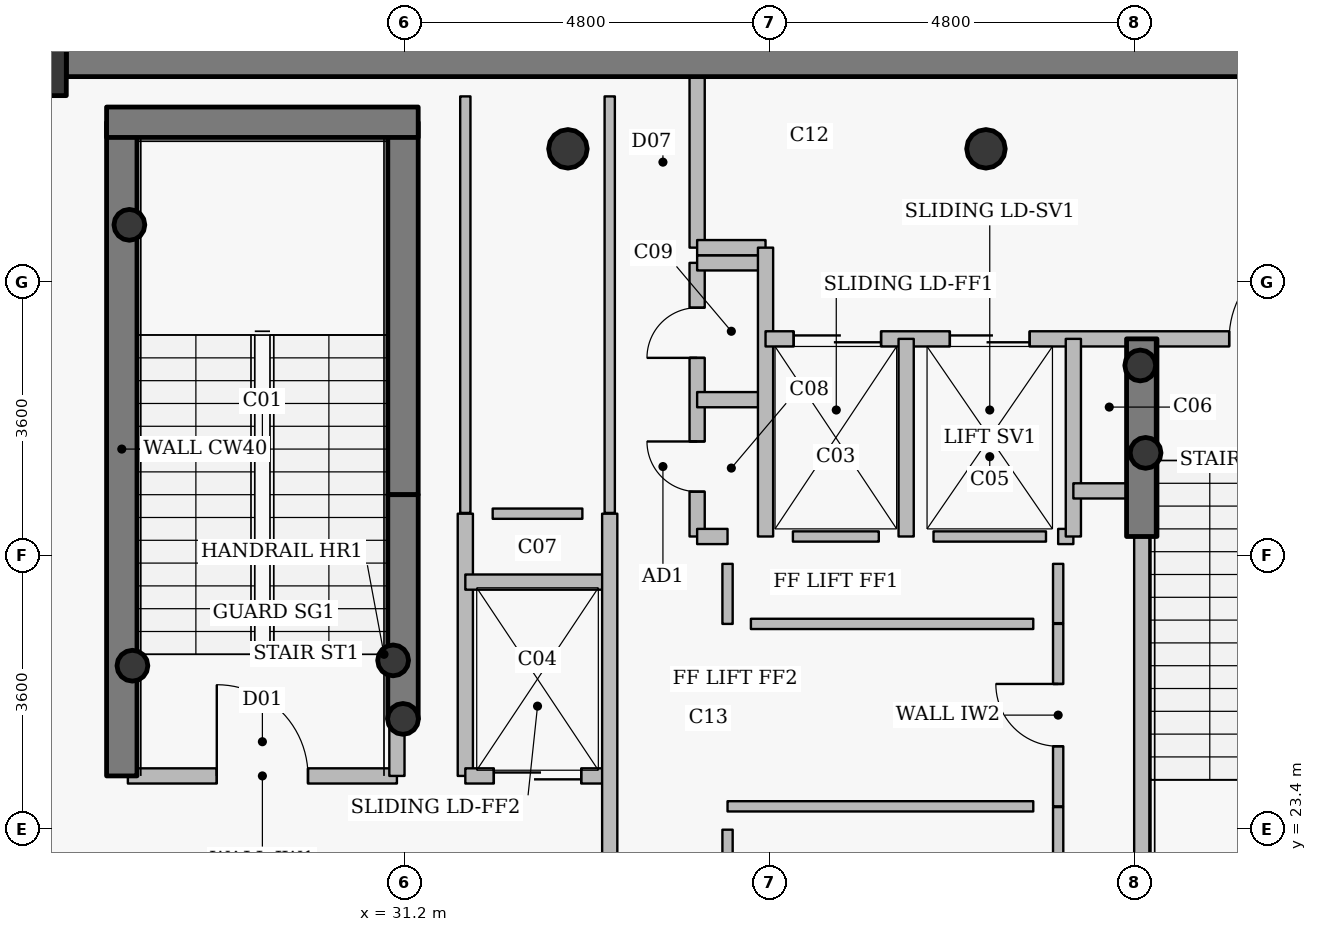
"""IFC4 building model, lengths in metres.
Left out: names, types, materials, properties, quantities, classifications, styles, units other than length and angle.
Written with IfcOpenShell. Run it as: python <this file> out.ifc"""

import sys

from ifc_helpers import new_model, si_unit, direction, frame, frame_2d, origin, origin_2d, place, context, subcontext, project, spatial, rectangle, hollow_circle, extrude, source, transform, mapped, element, fill, save


model = new_model("IFC4")
c1 = context("Model", 3, precision=1e-05, world=origin(), true_north=direction((0.0, 1.0)))
c2 = subcontext(c1, "Body", "Model", "MODEL_VIEW")
j1 = project(units=[si_unit("LENGTHUNIT", "METRE"), si_unit("PLANEANGLEUNIT", "RADIAN")], contexts=[c1])
p1 = place(None, origin())
s1 = spatial("IfcSite", under=j1, at=p1, CompositionType="ELEMENT")
p2 = place(p1, origin())
s2 = spatial("IfcBuilding", under=s1, at=p2, CompositionType="ELEMENT")
p3 = place(p2, frame((0.0, 0.0, -9.0)))
s3 = spatial("IfcBuildingStorey", under=s2, at=p3, CompositionType="ELEMENT", Elevation=-9.0)
p4 = place(p3, frame((26.05, 33.75, 0.0), z_axis=(0.0, 0.0, 1.0), x_axis=(1.0, 0.0, 0.0)))
e1 = element("IfcColumn", 1, at=p4, inside=s3, PredefinedType="COLUMN", context=c2, shape_type="SweptSolid", body=[
    extrude(rectangle(XDim=1.4, YDim=1.4, at=origin_2d()), origin(), (0.0, 0.0, 1.0), 4.5),
])
for number, where, z_axis, x_axis in (
    (2, (38.85, 32.35, 0.0), (0.0, 0.0, 1.0), (1.0, 0.0, 0.0)),
    (3, (33.35, 32.35, 0.0), (0.0, 0.0, 1.0), (1.0, 0.0, 0.0)),
):
    element("IfcColumn", number, at=place(p3, frame(where, z_axis=z_axis, x_axis=x_axis)), inside=s3, PredefinedType="COLUMN", context=c2, shape_type="SweptSolid", body=[
        extrude(hollow_circle(Radius=0.254, WallThickness=0.02, at=origin_2d()), origin(), (0.0, 0.0, 1.0), 4.5),
    ])
p5 = place(p3, frame((27.48, 24.1, 0.0), z_axis=(0.0, 0.0, 1.0), x_axis=(0.0, 1.0, 0.0)))
e4 = element("IfcWall", 4, at=p5, inside=s3, PredefinedType="SHEAR", context=c2, shape_type="SweptSolid", body=[
    extrude(rectangle(XDim=8.6, YDim=0.4, at=frame_2d((4.3, 0.0))), origin(), (0.0, 0.0, 1.0), 4.5),
])
p6 = place(p3, frame((31.18, 27.8, 0.0), z_axis=(0.0, 0.0, 1.0), x_axis=(0.0, 1.0, 0.0)))
e5 = element("IfcWall", 5, at=p6, inside=s3, PredefinedType="SHEAR", context=c2, shape_type="SweptSolid", body=[
    extrude(rectangle(XDim=4.9, YDim=0.4, at=frame_2d((2.45, 0.0))), origin(), (0.0, 0.0, 1.0), 4.5),
])
p7 = place(p3, frame((27.28, 32.7, 0.0), z_axis=(0.0, 0.0, 1.0), x_axis=(1.0, 0.0, 0.0)))
e6 = element("IfcWall", 6, at=p7, inside=s3, PredefinedType="SHEAR", context=c2, shape_type="SweptSolid", body=[
    extrude(rectangle(XDim=4.1, YDim=0.4, at=frame_2d((2.05, 0.0))), origin(), (0.0, 0.0, 1.0), 4.5),
])
for number, where, z_axis, x_axis in (
    (7, (27.58, 31.35, 0.0), (0.0, 0.0, 1.0), (1.0, 0.0, 0.0)),
    (8, (31.05, 25.62, 0.0), (0.0, 0.0, 1.0), (1.0, 0.0, 0.0)),
    (9, (31.18, 24.85, 0.0), (0.0, 0.0, 1.0), (1.0, 0.0, 0.0)),
    (10, (27.62, 25.55, 0.0), (0.0, 0.0, 1.0), (1.0, 0.0, 0.0)),
    (11, (40.95, 28.35, 0.0), (0.0, 0.0, 1.0), (1.0, 0.0, 0.0)),
    (12, (40.88, 29.5, 0.0), (0.0, 0.0, 1.0), (1.0, 0.0, 0.0)),
):
    element("IfcColumn", number, at=place(p3, frame(where, z_axis=z_axis, x_axis=x_axis)), inside=s3, PredefinedType="COLUMN", context=c2, shape_type="SweptSolid", body=[
        extrude(hollow_circle(Radius=0.203, WallThickness=0.016, at=origin_2d()), origin(), (0.0, 0.0, 1.0), 4.5),
    ])
p8 = place(p3, frame((26.75, 33.75, 0.0), z_axis=(0.0, 0.0, 1.0), x_axis=(1.0, 0.0, 0.0)))
e13 = element("IfcWall", 13, at=p8, inside=s3, PredefinedType="SHEAR", context=c2, shape_type="SweptSolid", body=[
    extrude(rectangle(XDim=18.5, YDim=0.9, at=frame_2d((9.25, 0.0))), origin(), (0.0, 0.0, 1.0), 3.65),
])
p9 = place(p3, frame((31.18, 24.85, 0.0), z_axis=(0.0, 0.0, 1.0), x_axis=(0.0, 1.0, 0.0)))
e14 = element("IfcWall", 14, at=p9, inside=s3, PredefinedType="SHEAR", context=c2, shape_type="SweptSolid", body=[
    extrude(rectangle(XDim=2.95, YDim=0.4, at=frame_2d((1.475, 0.0))), origin(), (0.0, 0.0, 1.0), 3.8),
])
p10 = place(p3, frame((40.9, 27.25, 0.0), z_axis=(0.0, 0.0, 1.0), x_axis=(0.0, 1.0, 0.0)))
e15 = element("IfcWall", 15, at=p10, inside=s3, PredefinedType="SHEAR", context=c2, shape_type="SweptSolid", body=[
    extrude(rectangle(XDim=2.6, YDim=0.4, at=frame_2d((1.3, 0.0))), origin(), (0.0, 0.0, 1.0), 3.8),
])
p11 = place(p3, frame((27.56, 24.1, 0.0), z_axis=(0.0, 0.0, 1.0), x_axis=(1.0, 0.0, 0.0)))
e16 = element("IfcWall", 16, at=p11, inside=s3, PredefinedType="PARTITIONING", context=c2, shape_type="SweptSolid", body=[
    extrude(rectangle(XDim=3.54, YDim=0.2, at=frame_2d((1.77, 0.0))), origin(), (0.0, 0.0, 1.0), 4.2),
])
p12 = place(p11, frame((1.17, 0.0, 0.0)))
e17 = element("IfcOpeningElement", 17, at=p12, cuts=e16, PredefinedType="OPENING", context=c2, shape_type="SweptSolid", body=[
    extrude(rectangle(XDim=1.2, YDim=2.15, at=origin_2d()), frame((0.6, 0.11, 1.075), z_axis=(0.0, -1.0, 0.0), x_axis=(1.0, 0.0, 0.0)), (0.0, 0.0, 1.0), 0.22),
])
p13 = place(p3, frame((31.1, 24.1, 0.0), z_axis=(0.0, 0.0, 1.0), x_axis=(0.0, 1.0, 0.0)))
e18 = element("IfcWall", 18, at=p13, inside=s3, PredefinedType="PARTITIONING", context=c2, shape_type="SweptSolid", body=[
    extrude(rectangle(XDim=0.74, YDim=0.2, at=frame_2d((0.37, 0.0))), origin(), (0.0, 0.0, 1.0), 4.2),
])
p14 = place(p3, frame((32.0, 24.1, 0.0), z_axis=(0.0, 0.0, 1.0), x_axis=(0.0, 1.0, 0.0)))
e19 = element("IfcWall", 19, at=p14, inside=s3, PredefinedType="PARTITIONING", context=c2, shape_type="SweptSolid", body=[
    extrude(rectangle(XDim=3.45, YDim=0.2, at=frame_2d((1.725, 0.0))), origin(), (0.0, 0.0, 1.0), 4.2),
])
p15 = place(p3, frame((32.0, 24.1, 0.0), z_axis=(0.0, 0.0, 1.0), x_axis=(1.0, 0.0, 0.0)))
e20 = element("IfcWall", 20, at=p15, inside=s3, PredefinedType="PARTITIONING", context=c2, shape_type="SweptSolid", body=[
    extrude(rectangle(XDim=1.9, YDim=0.2, at=frame_2d((0.95, 0.0))), origin(), (0.0, 0.0, 1.0), 3.785),
])
p16 = place(p15, frame((0.375, 0.0, 0.0)))
e21 = element("IfcOpeningElement", 21, at=p16, cuts=e20, PredefinedType="OPENING", context=c2, shape_type="SweptSolid", body=[
    extrude(rectangle(XDim=1.15, YDim=2.15, at=origin_2d()), frame((0.575, 0.11, 1.075), z_axis=(0.0, -1.0, 0.0), x_axis=(1.0, 0.0, 0.0)), (0.0, 0.0, 1.0), 0.22),
])
p17 = place(p3, frame((32.0, 26.65, 0.0), z_axis=(0.0, 0.0, 1.0), x_axis=(1.0, 0.0, 0.0)))
e22 = element("IfcWall", 22, at=p17, inside=s3, PredefinedType="PARTITIONING", context=c2, shape_type="SweptSolid", body=[
    extrude(rectangle(XDim=1.9, YDim=0.2, at=frame_2d((0.95, 0.0))), origin(), (0.0, 0.0, 1.0), 3.785),
])
p18 = place(p3, frame((33.9, 20.7, 0.0), z_axis=(0.0, 0.0, 1.0), x_axis=(0.0, 1.0, 0.0)))
e23 = element("IfcWall", 23, at=p18, inside=s3, PredefinedType="PARTITIONING", context=c2, shape_type="SweptSolid", body=[
    extrude(rectangle(XDim=6.85, YDim=0.2, at=frame_2d((3.425, 0.0))), origin(), (0.0, 0.0, 1.0), 3.785),
])
p19 = place(p3, frame((35.05, 27.25, 0.0), z_axis=(0.0, 0.0, 1.0), x_axis=(0.0, 1.0, 0.0)))
e24 = element("IfcWall", 24, at=p19, inside=s3, PredefinedType="PARTITIONING", context=c2, shape_type="SweptSolid", body=[
    extrude(rectangle(XDim=3.6, YDim=0.2, at=frame_2d((1.8, 0.0))), origin(), (0.0, 0.0, 1.0), 4.2),
])
p20 = place(p19, frame((0.59, 0.0, 0.0)))
e25 = element("IfcOpeningElement", 25, at=p20, cuts=e24, PredefinedType="OPENING", context=c2, shape_type="SweptSolid", body=[
    extrude(rectangle(XDim=0.66, YDim=2.05, at=origin_2d()), frame((0.33, 0.11, 1.025), z_axis=(0.0, -1.0, 0.0), x_axis=(1.0, 0.0, 0.0)), (0.0, 0.0, 1.0), 0.22),
])
p21 = place(p19, frame((2.35, 0.0, 0.0)))
e26 = element("IfcOpeningElement", 26, at=p21, cuts=e24, PredefinedType="OPENING", context=c2, shape_type="SweptSolid", body=[
    extrude(rectangle(XDim=0.66, YDim=2.05, at=origin_2d()), frame((0.33, 0.11, 1.025), z_axis=(0.0, -1.0, 0.0), x_axis=(1.0, 0.0, 0.0)), (0.0, 0.0, 1.0), 0.22),
])
p22 = place(p3, frame((35.05, 27.25, 0.0), z_axis=(0.0, 0.0, 1.0), x_axis=(1.0, 0.0, 0.0)))
e27 = element("IfcWall", 27, at=p22, inside=s3, PredefinedType="PARTITIONING", context=c2, shape_type="SweptSolid", body=[
    extrude(rectangle(XDim=0.4, YDim=0.2, at=frame_2d((0.2, 0.0))), origin(), (0.0, 0.0, 1.0), 4.2),
])
for number, where, z_axis, x_axis in (
    (28, (35.05, 29.05, 0.0), (0.0, 0.0, 1.0), (1.0, 0.0, 0.0)),
    (29, (35.05, 30.85, 0.0), (0.0, 0.0, 1.0), (1.0, 0.0, 0.0)),
):
    element("IfcWall", number, at=place(p3, frame(where, z_axis=z_axis, x_axis=x_axis)), inside=s3, PredefinedType="PARTITIONING", context=c2, shape_type="SweptSolid", body=[
        extrude(rectangle(XDim=0.9, YDim=0.2, at=frame_2d((0.45, 0.0))), origin(), (0.0, 0.0, 1.0), 4.2),
    ])
p23 = place(p3, frame((35.05, 31.05, 0.0), z_axis=(0.0, 0.0, 1.0), x_axis=(0.0, 1.0, 0.0)))
e30 = element("IfcWall", 30, at=p23, inside=s3, PredefinedType="PARTITIONING", context=c2, shape_type="SweptSolid", body=[
    extrude(rectangle(XDim=2.25, YDim=0.2, at=frame_2d((1.125, 0.0))), origin(), (0.0, 0.0, 1.0), 3.785),
])
p24 = place(p3, frame((35.05, 31.05, 0.0), z_axis=(0.0, 0.0, 1.0), x_axis=(1.0, 0.0, 0.0)))
e31 = element("IfcWall", 31, at=p24, inside=s3, PredefinedType="PARTITIONING", context=c2, shape_type="SweptSolid", body=[
    extrude(rectangle(XDim=0.9, YDim=0.2, at=frame_2d((0.45, 0.0))), origin(), (0.0, 0.0, 1.0), 4.2),
])
p25 = place(p3, frame((35.95, 27.25, 0.0), z_axis=(0.0, 0.0, 1.0), x_axis=(0.0, 1.0, 0.0)))
e32 = element("IfcWall", 32, at=p25, inside=s3, PredefinedType="PARTITIONING", context=c2, shape_type="SweptSolid", body=[
    extrude(rectangle(XDim=3.8, YDim=0.2, at=frame_2d((1.9, 0.0))), origin(), (0.0, 0.0, 1.0), 4.2),
])
p26 = place(p3, frame((35.95, 29.85, 0.0), z_axis=(0.0, 0.0, 1.0), x_axis=(1.0, 0.0, 0.0)))
e33 = element("IfcWall", 33, at=p26, inside=s3, PredefinedType="PARTITIONING", context=c2, shape_type="SweptSolid", body=[
    extrude(rectangle(XDim=8.49, YDim=0.2, at=frame_2d((4.245, 0.0))), origin(), (0.0, 0.0, 1.0), 3.785),
])
p27 = place(p26, frame((6.1, 0.0, 0.0)))
e34 = element("IfcOpeningElement", 34, at=p27, cuts=e33, PredefinedType="OPENING", context=c2, shape_type="SweptSolid", body=[
    extrude(rectangle(XDim=1.2, YDim=2.15, at=origin_2d()), frame((0.6, 0.11, 1.075), z_axis=(0.0, -1.0, 0.0), x_axis=(1.0, 0.0, 0.0)), (0.0, 0.0, 1.0), 0.22),
])
p28 = place(p26, frame((0.37, 0.0, 0.0)))
e35 = element("IfcOpeningElement", 35, at=p28, cuts=e33, PredefinedType="OPENING", context=c2, shape_type="SweptSolid", body=[
    extrude(rectangle(XDim=1.15, YDim=2.15, at=origin_2d()), frame((0.575, 0.11, 1.075), z_axis=(0.0, -1.0, 0.0), x_axis=(1.0, 0.0, 0.0)), (0.0, 0.0, 1.0), 0.22),
])
p29 = place(p26, frame((2.425, 0.0, 0.0)))
e36 = element("IfcOpeningElement", 36, at=p29, cuts=e33, PredefinedType="OPENING", context=c2, shape_type="SweptSolid", body=[
    extrude(rectangle(XDim=1.05, YDim=2.15, at=origin_2d()), frame((0.525, 0.11, 1.075), z_axis=(0.0, -1.0, 0.0), x_axis=(1.0, 0.0, 0.0)), (0.0, 0.0, 1.0), 0.22),
])
p30 = place(p3, frame((37.8, 27.25, 0.0), z_axis=(0.0, 0.0, 1.0), x_axis=(0.0, 1.0, 0.0)))
e37 = element("IfcWall", 37, at=p30, inside=s3, PredefinedType="PARTITIONING", context=c2, shape_type="SweptSolid", body=[
    extrude(rectangle(XDim=2.6, YDim=0.2, at=frame_2d((1.3, 0.0))), origin(), (0.0, 0.0, 1.0), 4.2),
])
p31 = place(p3, frame((39.8, 23.7, 0.0), z_axis=(0.0, 0.0, 1.0), x_axis=(0.0, 1.0, 0.0)))
e38 = element("IfcWall", 38, at=p31, inside=s3, PredefinedType="PARTITIONING", context=c2, shape_type="SweptSolid", body=[
    extrude(rectangle(XDim=2.4, YDim=0.135, at=frame_2d((1.2, 0.0))), origin(), (0.0, 0.0, 1.0), 4.2),
])
p32 = place(p31, frame((0.79, 0.0, 0.0)))
e39 = element("IfcOpeningElement", 39, at=p32, cuts=e38, PredefinedType="OPENING", context=c2, shape_type="SweptSolid", body=[
    extrude(rectangle(XDim=0.82, YDim=2.1, at=origin_2d()), frame((0.41, 0.078, 1.05), z_axis=(0.0, -1.0, 0.0), x_axis=(1.0, 0.0, 0.0)), (0.0, 0.0, 1.0), 0.155),
])
p33 = place(p3, frame((39.8, 27.25, 0.0), z_axis=(0.0, 0.0, 1.0), x_axis=(1.0, 0.0, 0.0)))
e40 = element("IfcWall", 40, at=p33, inside=s3, PredefinedType="PARTITIONING", context=c2, shape_type="SweptSolid", body=[
    extrude(rectangle(XDim=0.2, YDim=0.2, at=frame_2d((0.1, 0.0))), origin(), (0.0, 0.0, 1.0), 4.2),
])
p34 = place(p3, frame((40.0, 27.25, 0.0), z_axis=(0.0, 0.0, 1.0), x_axis=(0.0, 1.0, 0.0)))
e41 = element("IfcWall", 41, at=p34, inside=s3, PredefinedType="PARTITIONING", context=c2, shape_type="SweptSolid", body=[
    extrude(rectangle(XDim=2.6, YDim=0.2, at=frame_2d((1.3, 0.0))), origin(), (0.0, 0.0, 1.0), 4.2),
])
p35 = place(p3, frame((40.0, 27.85, 0.0), z_axis=(0.0, 0.0, 1.0), x_axis=(1.0, 0.0, 0.0)))
e42 = element("IfcWall", 42, at=p35, inside=s3, PredefinedType="PARTITIONING", context=c2, shape_type="SweptSolid", body=[
    extrude(rectangle(XDim=0.9, YDim=0.2, at=frame_2d((0.45, 0.0))), origin(), (0.0, 0.0, 1.0), 4.2),
])
p36 = place(p3, frame((40.9, 21.33, 0.0), z_axis=(0.0, 0.0, 1.0), x_axis=(0.0, 1.0, 0.0)))
e43 = element("IfcWall", 43, at=p36, inside=s3, PredefinedType="PARTITIONING", context=c2, shape_type="SweptSolid", body=[
    extrude(rectangle(XDim=5.91, YDim=0.2, at=frame_2d((2.955, 0.0))), origin(), (0.0, 0.0, 1.0), 3.735),
])
p37 = place(p3, frame((37.44, 27.25, 0.0), z_axis=(0.0, 0.0, 1.0), x_axis=(-1.0, 0.0, 0.0)))
e44 = element("IfcWall", 44, at=p37, inside=s3, PredefinedType="PARTITIONING", context=c2, shape_type="SweptSolid", body=[
    extrude(rectangle(XDim=1.13, YDim=0.135, at=frame_2d((0.565, 0.0))), origin(), (0.0, 0.0, 1.0), 4.2),
])
p38 = place(p3, frame((39.64, 27.25, 0.0), z_axis=(0.0, 0.0, 1.0), x_axis=(-1.0, 0.0, 0.0)))
e45 = element("IfcWall", 45, at=p38, inside=s3, PredefinedType="PARTITIONING", context=c2, shape_type="SweptSolid", body=[
    extrude(rectangle(XDim=1.48, YDim=0.135, at=frame_2d((0.74, 0.0))), origin(), (0.0, 0.0, 1.0), 3.785),
])
p39 = place(p3, frame((32.36, 27.55, 0.0), z_axis=(0.0, 0.0, 1.0), x_axis=(1.0, 0.0, 0.0)))
e46 = element("IfcWall", 46, at=p39, inside=s3, PredefinedType="PARTITIONING", context=c2, shape_type="SweptSolid", body=[
    extrude(rectangle(XDim=1.18, YDim=0.135, at=frame_2d((0.59, 0.0))), origin(), (0.0, 0.0, 1.0), 3.785),
])
p40 = place(p3, frame((39.8, 20.96, 0.0), z_axis=(0.0, 0.0, 1.0), x_axis=(0.0, 1.0, 0.0)))
e47 = element("IfcWall", 47, at=p40, inside=s3, PredefinedType="PARTITIONING", context=c2, shape_type="SweptSolid", body=[
    extrude(rectangle(XDim=2.73, YDim=0.135, at=frame_2d((1.365, 0.0))), origin(), (0.0, 0.0, 1.0), 3.735),
])
p41 = place(p3, frame((39.8, 26.11, 0.0), z_axis=(0.0, 0.0, 1.0), x_axis=(0.0, 1.0, 0.0)))
e48 = element("IfcWall", 48, at=p41, inside=s3, PredefinedType="PARTITIONING", context=c2, shape_type="SweptSolid", body=[
    extrude(rectangle(XDim=0.78, YDim=0.135, at=frame_2d((0.39, 0.0))), origin(), (0.0, 0.0, 1.0), 4.2),
])
p42 = place(p3, frame((32.0, 33.04, 0.0), z_axis=(0.0, 0.0, 1.0), x_axis=(0.0, -1.0, 0.0)))
e49 = element("IfcWall", 49, at=p42, inside=s3, PredefinedType="PARTITIONING", context=c2, shape_type="SweptSolid", body=[
    extrude(rectangle(XDim=5.48, YDim=0.135, at=frame_2d((2.74, 0.0))), origin(), (0.0, 0.0, 1.0), 3.735),
])
p43 = place(p3, frame((35.45, 26.89, 0.0), z_axis=(0.0, 0.0, 1.0), x_axis=(0.0, -1.0, 0.0)))
e50 = element("IfcWall", 50, at=p43, inside=s3, PredefinedType="PARTITIONING", context=c2, shape_type="SweptSolid", body=[
    extrude(rectangle(XDim=0.79, YDim=0.135, at=frame_2d((0.395, 0.0))), origin(), (0.0, 0.0, 1.0), 4.2),
])
p44 = place(p3, frame((35.758, 26.1, 0.0), z_axis=(0.0, 0.0, 1.0), x_axis=(1.0, 0.0, 0.0)))
e51 = element("IfcWall", 51, at=p44, inside=s3, PredefinedType="PARTITIONING", context=c2, shape_type="SweptSolid", body=[
    extrude(rectangle(XDim=3.715, YDim=0.135, at=frame_2d((1.857, 0.0))), origin(), (0.0, 0.0, 1.0), 3.785),
])
p45 = place(p3, frame((39.472, 23.7, 0.0), z_axis=(0.0, 0.0, 1.0), x_axis=(-1.0, 0.0, 0.0)))
e52 = element("IfcWall", 52, at=p45, inside=s3, PredefinedType="PARTITIONING", context=c2, shape_type="SweptSolid", body=[
    extrude(rectangle(XDim=4.022, YDim=0.135, at=frame_2d((2.011, 0.0))), origin(), (0.0, 0.0, 1.0), 3.785),
])
p46 = place(p3, frame((35.45, 23.393, 0.0), z_axis=(0.0, 0.0, 1.0), x_axis=(0.0, -1.0, 0.0)))
e53 = element("IfcWall", 53, at=p46, inside=s3, PredefinedType="PARTITIONING", context=c2, shape_type="SweptSolid", body=[
    extrude(rectangle(XDim=2.433, YDim=0.135, at=frame_2d((1.216, 0.0))), origin(), (0.0, 0.0, 1.0), 3.785),
])
p47 = place(p3, frame((33.9, 27.56, 0.0), z_axis=(0.0, 0.0, 1.0), x_axis=(0.0, 1.0, 0.0)))
e54 = element("IfcWall", 54, at=p47, inside=s3, PredefinedType="PARTITIONING", context=c2, shape_type="SweptSolid", body=[
    extrude(rectangle(XDim=5.48, YDim=0.135, at=frame_2d((2.74, 0.0))), origin(), (0.0, 0.0, 1.0), 3.785),
])
m1 = source(origin(), c2, "Body", "SweptSolid", [
    extrude(rectangle(XDim=1.2, YDim=2.15, at=origin_2d()), frame((0.6, 0.025, 1.075), z_axis=(0.0, -1.0, 0.0), x_axis=(1.0, 0.0, 0.0)), (0.0, 0.0, 1.0), 0.05),
])
p48 = place(p12, origin())
e55 = element("IfcDoor", 55, at=p48, inside=s3, OperationType="SINGLE_SWING_LEFT", PredefinedType="DOOR", context=c2, shape_type="MappedRepresentation", body=[
    mapped(m1, transform((0.0, 0.0, 0.0), x_axis=(1.0, 0.0, 0.0), y_axis=(0.0, 1.0, 0.0), z_axis=(0.0, 0.0, 1.0), scale=1.0)),
])
fill(e17, e55)
p49 = place(p27, origin())
e56 = element("IfcDoor", 56, at=p49, inside=s3, OperationType="SINGLE_SWING_RIGHT", PredefinedType="DOOR", context=c2, shape_type="MappedRepresentation", body=[
    mapped(m1, transform((0.0, 0.0, 0.0), x_axis=(1.0, 0.0, 0.0), y_axis=(0.0, 1.0, 0.0), z_axis=(0.0, 0.0, 1.0), scale=1.0)),
])
fill(e34, e56)
m2 = source(origin(), c2, "Body", "SweptSolid", [
    extrude(rectangle(XDim=1.15, YDim=2.15, at=origin_2d()), frame((0.575, 0.025, 1.075), z_axis=(0.0, -1.0, 0.0), x_axis=(1.0, 0.0, 0.0)), (0.0, 0.0, 1.0), 0.05),
])
p50 = place(p28, origin())
e57 = element("IfcDoor", 57, at=p50, inside=s3, OperationType="DOUBLE_DOOR_SLIDING", PredefinedType="USERDEFINED", context=c2, shape_type="MappedRepresentation", body=[
    mapped(m2, transform((0.0, 0.0, 0.0), x_axis=(1.0, 0.0, 0.0), y_axis=(0.0, 1.0, 0.0), z_axis=(0.0, 0.0, 1.0), scale=1.0)),
])
fill(e35, e57)
p51 = place(p16, origin())
e58 = element("IfcDoor", 58, at=p51, inside=s3, OperationType="DOUBLE_DOOR_SLIDING", PredefinedType="USERDEFINED", context=c2, shape_type="MappedRepresentation", body=[
    mapped(m2, transform((0.0, 0.0, 0.0), x_axis=(1.0, 0.0, 0.0), y_axis=(0.0, 1.0, 0.0), z_axis=(0.0, 0.0, 1.0), scale=1.0)),
])
fill(e21, e58)
m3 = source(origin(), c2, "Body", "SweptSolid", [
    extrude(rectangle(XDim=1.05, YDim=2.15, at=origin_2d()), frame((0.525, 0.025, 1.075), z_axis=(0.0, -1.0, 0.0), x_axis=(1.0, 0.0, 0.0)), (0.0, 0.0, 1.0), 0.05),
])
p52 = place(p29, origin())
e59 = element("IfcDoor", 59, at=p52, inside=s3, OperationType="DOUBLE_DOOR_SLIDING", PredefinedType="USERDEFINED", context=c2, shape_type="MappedRepresentation", body=[
    mapped(m3, transform((0.0, 0.0, 0.0), x_axis=(1.0, 0.0, 0.0), y_axis=(0.0, 1.0, 0.0), z_axis=(0.0, 0.0, 1.0), scale=1.0)),
])
fill(e36, e59)
m4 = source(origin(), c2, "Body", "SweptSolid", [
    extrude(rectangle(XDim=0.66, YDim=2.05, at=origin_2d()), frame((0.33, 0.025, 1.025), z_axis=(0.0, -1.0, 0.0), x_axis=(1.0, 0.0, 0.0)), (0.0, 0.0, 1.0), 0.05),
])
p53 = place(p20, origin())
e60 = element("IfcDoor", 60, at=p53, inside=s3, OperationType="SINGLE_SWING_RIGHT", PredefinedType="USERDEFINED", context=c2, shape_type="MappedRepresentation", body=[
    mapped(m4, transform((0.0, 0.0, 0.0), x_axis=(1.0, 0.0, 0.0), y_axis=(0.0, 1.0, 0.0), z_axis=(0.0, 0.0, 1.0), scale=1.0)),
])
fill(e25, e60)
p54 = place(p21, origin())
e61 = element("IfcDoor", 61, at=p54, inside=s3, OperationType="SINGLE_SWING_LEFT", PredefinedType="USERDEFINED", context=c2, shape_type="MappedRepresentation", body=[
    mapped(m4, transform((0.0, 0.0, 0.0), x_axis=(1.0, 0.0, 0.0), y_axis=(0.0, 1.0, 0.0), z_axis=(0.0, 0.0, 1.0), scale=1.0)),
])
fill(e26, e61)
m5 = source(origin(), c2, "Body", "SweptSolid", [
    extrude(rectangle(XDim=0.82, YDim=2.1, at=origin_2d()), frame((0.41, 0.025, 1.05), z_axis=(0.0, -1.0, 0.0), x_axis=(1.0, 0.0, 0.0)), (0.0, 0.0, 1.0), 0.05),
])
p55 = place(p32, origin())
e62 = element("IfcDoor", 62, at=p55, inside=s3, OperationType="SINGLE_SWING_RIGHT", PredefinedType="DOOR", context=c2, shape_type="MappedRepresentation", body=[
    mapped(m5, transform((0.0, 0.0, 0.0), x_axis=(1.0, 0.0, 0.0), y_axis=(0.0, 1.0, 0.0), z_axis=(0.0, 0.0, 1.0), scale=1.0)),
])
fill(e39, e62)
save(model, sys.argv[1])
